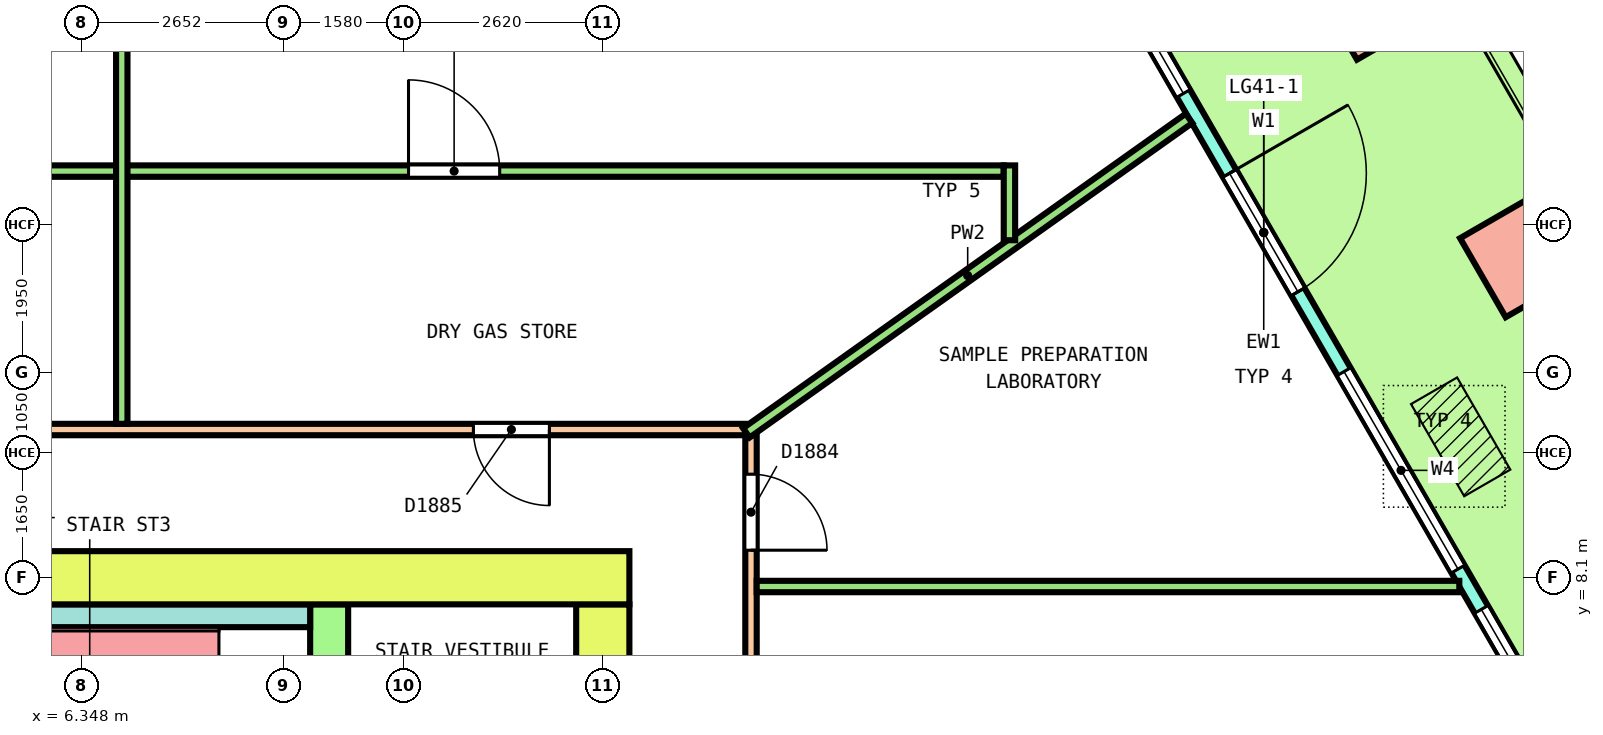
"""IFC4 building model, lengths in metres.
Left out: names, types, materials, properties, quantities, classifications, styles, units other than length and angle.
Written with IfcOpenShell. Run it as: python <this file> out.ifc"""

import sys

from ifc_helpers import new_model, si_unit, direction, frame, frame_2d, origin, origin_2d, place, context, subcontext, project, spatial, polyline, rectangle, outline, extrude, element, fill, save


model = new_model("IFC4")
c1 = context("Model", 3, precision=1e-05, world=origin(), true_north=direction((0.0, 1.0)))
c2 = subcontext(c1, "Body", "Model", "MODEL_VIEW")
j1 = project(units=[si_unit("LENGTHUNIT", "METRE"), si_unit("PLANEANGLEUNIT", "RADIAN")], contexts=[c1])
p1 = place(None, origin())
s1 = spatial("IfcSite", under=j1, at=p1, CompositionType="ELEMENT")
p2 = place(p1, origin())
s2 = spatial("IfcBuilding", under=s1, at=p2, CompositionType="ELEMENT")
p3 = place(p2, frame((0.0, 0.0, 189.2)))
s3 = spatial("IfcBuildingStorey", under=s2, at=p3, CompositionType="ELEMENT", Elevation=189.2)
for number, where, z_axis, x_axis in (
    (1, (25.299, 12.347, 0.0), (0.0, 0.0, 1.0), (-0.5, 0.866, 0.0)),
    (2, (23.342, 15.736, 0.0), (0.0, 0.0, 1.0), (-0.5, 0.866, 0.0)),
):
    element("IfcColumn", number, at=place(p3, frame(where, z_axis=z_axis, x_axis=x_axis)), inside=s3, PredefinedType="COLUMN", context=c2, shape_type="SweptSolid", body=[
        extrude(rectangle(XDim=1.2, YDim=1.2, at=origin_2d()), origin(), (0.0, 0.0, 1.0), 4.05),
    ])
p4 = place(p3, frame((26.411, 4.82, 0.0), z_axis=(0.0, 0.0, 1.0), x_axis=(-0.500000137386, 0.866025324465, 0.0)))
e3 = element("IfcWall", 3, at=p4, inside=s3, PredefinedType="SOLIDWALL", context=c2, shape_type="SweptSolid", body=[
    extrude(outline(polyline([(-0.027, -0.1), (0.979, -0.1), (1.986, -0.1), (2.992, -0.1), (3.999, -0.1), (5.005, -0.1), (6.012, -0.1), (7.018, -0.1), (8.025, -0.1), (9.031, -0.1), (10.038, -0.1), (11.044, -0.1), (12.051, -0.1), (13.057, -0.1), (14.063, -0.1), (15.07, -0.1), (16.076, -0.1), (17.083, -0.1), (18.089, -0.1), (18.036, 0.1), (17.035, 0.1), (16.035, 0.1), (15.034, 0.1), (14.034, 0.1), (13.033, 0.1), (12.033, 0.1), (11.032, 0.1), (10.032, 0.1), (9.031, 0.1), (8.031, 0.1), (7.03, 0.1), (6.03, 0.1), (5.029, 0.1), (4.029, 0.1), (3.028, 0.1), (2.028, 0.1), (1.027, 0.1), (0.027, 0.1), (-0.027, -0.1)])), origin(), (0.0, 0.0, 1.0), 4.1),
])
p5 = place(p4, frame((0.306, 0.0, 0.1)))
e4 = element("IfcOpeningElement", 4, at=p5, cuts=e3, PredefinedType="OPENING", context=c2, shape_type="SweptSolid", body=[
    extrude(rectangle(XDim=3.0, YDim=2.9, at=frame_2d((1.5, 1.45))), frame((0.0, 0.11, 0.0), z_axis=(0.0, -1.0, 0.0), x_axis=(1.0, 0.0, 0.0)), (0.0, 0.0, 1.0), 0.22),
])
p6 = place(p4, frame((3.919, 0.0, 0.1)))
e5 = element("IfcOpeningElement", 5, at=p6, cuts=e3, PredefinedType="OPENING", context=c2, shape_type="SweptSolid", body=[
    extrude(rectangle(XDim=3.0, YDim=2.9, at=frame_2d((1.5, 1.45))), frame((0.0, 0.11, 0.0), z_axis=(0.0, -1.0, 0.0), x_axis=(1.0, 0.0, 0.0)), (0.0, 0.0, 1.0), 0.22),
])
p7 = place(p4, frame((8.131, 0.0, 0.0)))
e6 = element("IfcOpeningElement", 6, at=p7, cuts=e3, PredefinedType="OPENING", context=c2, shape_type="SweptSolid", body=[
    extrude(rectangle(XDim=1.8, YDim=2.4, at=frame_2d((0.9, 1.2))), frame((0.0, 0.11, 0.0), z_axis=(0.0, -1.0, 0.0), x_axis=(1.0, 0.0, 0.0)), (0.0, 0.0, 1.0), 0.22),
])
p8 = place(p4, frame((8.131, 0.0, 2.55)))
e7 = element("IfcOpeningElement", 7, at=p8, cuts=e3, PredefinedType="OPENING", context=c2, shape_type="SweptSolid", body=[
    extrude(rectangle(XDim=1.8, YDim=0.45, at=frame_2d((0.9, 0.225))), frame((0.0, 0.11, 0.0), z_axis=(0.0, -1.0, 0.0), x_axis=(1.0, 0.0, 0.0)), (0.0, 0.0, 1.0), 0.22),
])
p9 = place(p4, frame((11.144, 0.0, 0.1)))
e8 = element("IfcOpeningElement", 8, at=p9, cuts=e3, PredefinedType="OPENING", context=c2, shape_type="SweptSolid", body=[
    extrude(rectangle(XDim=3.0, YDim=2.9, at=frame_2d((1.5, 1.45))), frame((0.0, 0.11, 0.0), z_axis=(0.0, -1.0, 0.0), x_axis=(1.0, 0.0, 0.0)), (0.0, 0.0, 1.0), 0.22),
])
p10 = place(p4, frame((14.756, 0.0, 0.1)))
e9 = element("IfcOpeningElement", 9, at=p10, cuts=e3, PredefinedType="OPENING", context=c2, shape_type="SweptSolid", body=[
    extrude(rectangle(XDim=3.0, YDim=2.9, at=frame_2d((1.5, 1.45))), frame((0.0, 0.11, 0.0), z_axis=(0.0, -1.0, 0.0), x_axis=(1.0, 0.0, 0.0)), (0.0, 0.0, 1.0), 0.22),
])
p11 = place(p3, frame((-13.55, 8.1, 0.0), z_axis=(0.0, 0.0, 1.0), x_axis=(1.0, 0.0, 0.0)))
e10 = element("IfcWall", 10, at=p11, inside=s3, PredefinedType="SHEAR", context=c2, shape_type="SweptSolid", body=[
    extrude(rectangle(XDim=27.1, YDim=0.7, at=frame_2d((13.55, 0.0))), origin(), (0.0, 0.0, 1.0), 4.1),
])
p12 = place(p11, frame((14.475, 0.0, 0.0)))
e11 = element("IfcOpeningElement", 11, at=p12, cuts=e10, PredefinedType="OPENING", context=c2, shape_type="SweptSolid", body=[
    extrude(rectangle(XDim=1.4, YDim=2.1, at=frame_2d((0.7, 1.05))), frame((0.0, 0.36, 0.0), z_axis=(0.0, -1.0, 0.0), x_axis=(1.0, 0.0, 0.0)), (0.0, 0.0, 1.0), 0.72),
])
p13 = place(p3, frame((13.2, -7.75, 0.0), z_axis=(0.0, 0.0, 1.0), x_axis=(0.0, 1.0, 0.0)))
e12 = element("IfcWall", 12, at=p13, inside=s3, PredefinedType="SHEAR", context=c2, shape_type="SweptSolid", body=[
    extrude(rectangle(XDim=15.5, YDim=0.7, at=frame_2d((7.75, 0.0))), origin(), (0.0, 0.0, 1.0), 4.1),
])
p14 = place(p13, frame((6.55, 0.0, 0.0)))
e13 = element("IfcOpeningElement", 13, at=p14, cuts=e12, PredefinedType="OPENING", context=c2, shape_type="SweptSolid", body=[
    extrude(rectangle(XDim=2.4, YDim=2.1, at=frame_2d((1.2, 1.05))), frame((0.0, 0.36, 0.0), z_axis=(0.0, -1.0, 0.0), x_axis=(1.0, 0.0, 0.0)), (0.0, 0.0, 1.0), 0.72),
])
p15 = place(p13, frame((13.45, 0.0, 0.0)))
e14 = element("IfcOpeningElement", 14, at=p15, cuts=e12, PredefinedType="OPENING", context=c2, shape_type="SweptSolid", body=[
    extrude(rectangle(XDim=1.2, YDim=2.1, at=frame_2d((0.6, 1.05))), frame((0.0, 0.36, 0.0), z_axis=(0.0, -1.0, 0.0), x_axis=(1.0, 0.0, 0.0)), (0.0, 0.0, 1.0), 0.72),
])
p16 = place(p13, frame((0.181, 0.0, 0.0)))
e15 = element("IfcOpeningElement", 15, at=p16, cuts=e12, PredefinedType="OPENING", context=c2, shape_type="SweptSolid", body=[
    extrude(rectangle(XDim=1.0, YDim=2.1, at=frame_2d((0.5, 1.05))), frame((0.0, 0.36, 0.0), z_axis=(0.0, -1.0, 0.0), x_axis=(1.0, 0.0, 0.0)), (0.0, 0.0, 1.0), 0.72),
])
p17 = place(p13, frame((1.669, 0.0, 0.0)))
e16 = element("IfcOpeningElement", 16, at=p17, cuts=e12, PredefinedType="OPENING", context=c2, shape_type="SweptSolid", body=[
    extrude(rectangle(XDim=1.0, YDim=2.1, at=frame_2d((0.5, 1.05))), frame((0.0, 0.36, 0.0), z_axis=(0.0, -1.0, 0.0), x_axis=(1.0, 0.0, 0.0)), (0.0, 0.0, 1.0), 0.72),
])
p18 = place(p3, frame((9.6, -7.75, 0.0), z_axis=(0.0, 0.0, 1.0), x_axis=(0.0, 1.0, 0.0)))
e17 = element("IfcWall", 17, at=p18, inside=s3, PredefinedType="SHEAR", context=c2, shape_type="SweptSolid", body=[
    extrude(rectangle(XDim=15.5, YDim=0.5, at=frame_2d((7.75, 0.0))), origin(), (0.0, 0.0, 1.0), 4.1),
])
p19 = place(p18, frame((6.55, 0.0, 0.0)))
e18 = element("IfcOpeningElement", 18, at=p19, cuts=e17, PredefinedType="OPENING", context=c2, shape_type="SweptSolid", body=[
    extrude(rectangle(XDim=2.4, YDim=2.1, at=frame_2d((1.2, 1.05))), frame((0.0, 0.26, 0.0), z_axis=(0.0, -1.0, 0.0), x_axis=(1.0, 0.0, 0.0)), (0.0, 0.0, 1.0), 0.52),
])
p20 = place(p18, frame((13.45, 0.0, 0.0)))
e19 = element("IfcOpeningElement", 19, at=p20, cuts=e17, PredefinedType="OPENING", context=c2, shape_type="SweptSolid", body=[
    extrude(rectangle(XDim=1.2, YDim=2.1, at=frame_2d((0.6, 1.05))), frame((0.0, 0.26, 0.0), z_axis=(0.0, -1.0, 0.0), x_axis=(1.0, 0.0, 0.0)), (0.0, 0.0, 1.0), 0.52),
])
p21 = place(p18, frame((0.95, 0.0, 0.0)))
e20 = element("IfcOpeningElement", 20, at=p21, cuts=e17, PredefinedType="OPENING", context=c2, shape_type="SweptSolid", body=[
    extrude(rectangle(XDim=1.0, YDim=2.1, at=frame_2d((0.5, 1.05))), frame((0.0, 0.26, 0.0), z_axis=(0.0, -1.0, 0.0), x_axis=(1.0, 0.0, 0.0)), (0.0, 0.0, 1.0), 0.52),
])
p22 = place(p3, frame((3.55, 7.6, 0.0), z_axis=(0.0, 0.0, 1.0), x_axis=(1.0, 0.0, 0.0)))
e21 = element("IfcWall", 21, at=p22, inside=s3, PredefinedType="SOLIDWALL", context=c2, shape_type="SweptSolid", body=[
    extrude(rectangle(XDim=5.8, YDim=0.3, at=frame_2d((2.9, 0.0))), origin(), (0.0, 0.0, 1.0), 4.1),
])
p23 = place(p3, frame((15.15, 0.576, 0.0), z_axis=(0.0, 0.0, 1.0), x_axis=(0.0, 1.0, 0.0)))
e22 = element("IfcWall", 22, at=p23, inside=s3, PredefinedType="PARTITIONING", context=c2, shape_type="SweptSolid", body=[
    extrude(rectangle(XDim=9.399, YDim=0.15, at=frame_2d((4.7, 0.0))), origin(), (0.0, 0.0, 1.0), 3.05),
])
p24 = place(p23, frame((7.887, 0.0, 0.0)))
e23 = element("IfcOpeningElement", 23, at=p24, cuts=e22, PredefinedType="OPENING", context=c2, shape_type="SweptSolid", body=[
    extrude(rectangle(XDim=1.0, YDim=2.1, at=frame_2d((0.5, 1.05))), frame((0.0, 0.085, 0.0), z_axis=(0.0, -1.0, 0.0), x_axis=(1.0, 0.0, 0.0)), (0.0, 0.0, 1.0), 0.17),
])
p25 = place(p3, frame((-15.075, 10.05, 0.0), z_axis=(0.0, 0.0, 1.0), x_axis=(1.0, 0.0, 0.0)))
e24 = element("IfcWall", 24, at=p25, inside=s3, PredefinedType="PARTITIONING", context=c2, shape_type="SweptSolid", body=[
    extrude(rectangle(XDim=30.15, YDim=0.15, at=frame_2d((15.075, 0.0))), origin(), (0.0, 0.0, 1.0), 3.05),
])
p26 = place(p25, frame((26.573, 0.0, 0.0)))
e25 = element("IfcOpeningElement", 25, at=p26, cuts=e24, PredefinedType="OPENING", context=c2, shape_type="SweptSolid", body=[
    extrude(rectangle(XDim=1.0, YDim=2.1, at=frame_2d((0.5, 1.05))), frame((0.0, 0.085, 0.0), z_axis=(0.0, -1.0, 0.0), x_axis=(1.0, 0.0, 0.0)), (0.0, 0.0, 1.0), 0.17),
])
p27 = place(p25, frame((10.684, 0.0, 0.0)))
e26 = element("IfcOpeningElement", 26, at=p27, cuts=e24, PredefinedType="OPENING", context=c2, shape_type="SweptSolid", body=[
    extrude(rectangle(XDim=1.2, YDim=2.1, at=frame_2d((0.6, 1.05))), frame((0.0, 0.085, 0.0), z_axis=(0.0, -1.0, 0.0), x_axis=(1.0, 0.0, 0.0)), (0.0, 0.0, 1.0), 0.17),
])
p28 = place(p3, frame((15.225, 7.985, 0.0), z_axis=(0.0, 0.0, 1.0), x_axis=(1.0, 0.0, 0.0)))
e27 = element("IfcWall", 27, at=p28, inside=s3, PredefinedType="PARTITIONING", context=c2, shape_type="SweptSolid", body=[
    extrude(rectangle(XDim=9.243, YDim=0.15, at=frame_2d((4.622, 0.0))), origin(), (0.0, 0.0, 1.0), 3.05),
])
p29 = place(p3, frame((15.089, 10.007, 0.0), z_axis=(0.0, 0.0, 1.0), x_axis=(0.815227116073, 0.579141389661, 0.0)))
e28 = element("IfcWall", 28, at=p29, inside=s3, PredefinedType="PARTITIONING", context=c2, shape_type="SweptSolid", body=[
    extrude(rectangle(XDim=7.144, YDim=0.15, at=frame_2d((3.572, 0.0))), origin(), (0.0, 0.0, 1.0), 3.05),
])
p30 = place(p3, frame((-16.979, 13.45, 0.0), z_axis=(0.0, 0.0, 1.0), x_axis=(1.0, 0.0, 0.0)))
e29 = element("IfcWall", 29, at=p30, inside=s3, PredefinedType="PARTITIONING", context=c2, shape_type="SweptSolid", body=[
    extrude(rectangle(XDim=35.454, YDim=0.15, at=frame_2d((17.727, 0.0))), origin(), (0.0, 0.0, 1.0), 3.05),
])
p31 = place(p30, frame((27.623, 0.0, 0.0)))
e30 = element("IfcOpeningElement", 30, at=p31, cuts=e29, PredefinedType="OPENING", context=c2, shape_type="SweptSolid", body=[
    extrude(rectangle(XDim=1.2, YDim=2.1, at=frame_2d((0.6, 1.05))), frame((0.0, 0.085, 0.0), z_axis=(0.0, -1.0, 0.0), x_axis=(1.0, 0.0, 0.0)), (0.0, 0.0, 1.0), 0.17),
])
p32 = place(p3, frame((18.55, 12.541, 0.0), z_axis=(0.0, 0.0, 1.0), x_axis=(0.0, 1.0, 0.0)))
e31 = element("IfcWall", 31, at=p32, inside=s3, PredefinedType="PARTITIONING", context=c2, shape_type="SweptSolid", body=[
    extrude(rectangle(XDim=0.984, YDim=0.15, at=frame_2d((0.492, 0.0))), origin(), (0.0, 0.0, 1.0), 3.05),
])
p33 = place(p3, frame((6.872, 10.125, 0.0), z_axis=(0.0, 0.0, 1.0), x_axis=(0.0, 1.0, 0.0)))
e32 = element("IfcWall", 32, at=p33, inside=s3, PredefinedType="PARTITIONING", context=c2, shape_type="SweptSolid", body=[
    extrude(rectangle(XDim=13.675, YDim=0.15, at=frame_2d((6.837, 0.0))), origin(), (0.0, 0.0, 1.0), 3.05),
])
p34 = place(p33, frame((6.633, 0.0, 0.0)))
e33 = element("IfcOpeningElement", 33, at=p34, cuts=e32, PredefinedType="OPENING", context=c2, shape_type="SweptSolid", body=[
    extrude(rectangle(XDim=1.2, YDim=2.1, at=frame_2d((0.6, 1.05))), frame((0.0, 0.085, 0.0), z_axis=(0.0, -1.0, 0.0), x_axis=(1.0, 0.0, 0.0)), (0.0, 0.0, 1.0), 0.17),
])
p35 = place(p5, origin())
e34 = element("IfcWindow", 34, at=p35, inside=s3, PartitioningType="SINGLE_PANEL", PredefinedType="WINDOW", context=c2, shape_type="SweptSolid", body=[
    extrude(rectangle(XDim=3.0, YDim=2.9, at=frame_2d((1.5, 1.45))), frame((0.0, 0.03, 0.0), z_axis=(0.0, -1.0, 0.0), x_axis=(1.0, 0.0, 0.0)), (0.0, 0.0, 1.0), 0.06),
])
fill(e4, e34)
p36 = place(p6, origin())
e35 = element("IfcWindow", 35, at=p36, inside=s3, PartitioningType="SINGLE_PANEL", PredefinedType="WINDOW", context=c2, shape_type="SweptSolid", body=[
    extrude(rectangle(XDim=3.0, YDim=2.9, at=frame_2d((1.5, 1.45))), frame((0.0, 0.03, 0.0), z_axis=(0.0, -1.0, 0.0), x_axis=(1.0, 0.0, 0.0)), (0.0, 0.0, 1.0), 0.06),
])
fill(e5, e35)
p37 = place(p7, origin())
e36 = element("IfcDoor", 36, at=p37, inside=s3, OperationType="DOUBLE_DOOR_SINGLE_SWING", PredefinedType="DOOR", context=c2, shape_type="SweptSolid", body=[
    extrude(rectangle(XDim=1.8, YDim=2.4, at=frame_2d((0.9, 1.2))), frame((0.0, 0.025, 0.0), z_axis=(0.0, -1.0, 0.0), x_axis=(1.0, 0.0, 0.0)), (0.0, 0.0, 1.0), 0.05),
])
fill(e6, e36)
p38 = place(p8, origin())
e37 = element("IfcWindow", 37, at=p38, inside=s3, PartitioningType="SINGLE_PANEL", PredefinedType="WINDOW", context=c2, shape_type="SweptSolid", body=[
    extrude(rectangle(XDim=1.8, YDim=0.45, at=frame_2d((0.9, 0.225))), frame((0.0, 0.03, 0.0), z_axis=(0.0, -1.0, 0.0), x_axis=(1.0, 0.0, 0.0)), (0.0, 0.0, 1.0), 0.06),
])
fill(e7, e37)
p39 = place(p9, origin())
e38 = element("IfcWindow", 38, at=p39, inside=s3, PartitioningType="SINGLE_PANEL", PredefinedType="WINDOW", context=c2, shape_type="SweptSolid", body=[
    extrude(rectangle(XDim=3.0, YDim=2.9, at=frame_2d((1.5, 1.45))), frame((0.0, 0.03, 0.0), z_axis=(0.0, -1.0, 0.0), x_axis=(1.0, 0.0, 0.0)), (0.0, 0.0, 1.0), 0.06),
])
fill(e8, e38)
p40 = place(p24, origin())
e39 = element("IfcDoor", 39, at=p40, inside=s3, OperationType="SINGLE_SWING_RIGHT", PredefinedType="DOOR", context=c2, shape_type="SweptSolid", body=[
    extrude(rectangle(XDim=1.0, YDim=2.1, at=frame_2d((0.5, 1.05))), frame((0.0, 0.025, 0.0), z_axis=(0.0, -1.0, 0.0), x_axis=(1.0, 0.0, 0.0)), (0.0, 0.0, 1.0), 0.05),
])
fill(e23, e39)
p41 = place(p26, origin())
e40 = element("IfcDoor", 40, at=p41, inside=s3, OperationType="SINGLE_SWING_LEFT", PredefinedType="DOOR", context=c2, shape_type="SweptSolid", body=[
    extrude(rectangle(XDim=1.0, YDim=2.1, at=frame_2d((0.5, 1.05))), frame((0.0, 0.025, 0.0), z_axis=(0.0, -1.0, 0.0), x_axis=(1.0, 0.0, 0.0)), (0.0, 0.0, 1.0), 0.05),
])
fill(e25, e40)
p42 = place(p31, origin())
e41 = element("IfcDoor", 41, at=p42, inside=s3, OperationType="DOUBLE_DOOR_SINGLE_SWING", PredefinedType="DOOR", context=c2, shape_type="SweptSolid", body=[
    extrude(rectangle(XDim=1.2, YDim=2.1, at=frame_2d((0.6, 1.05))), frame((0.0, 0.025, 0.0), z_axis=(0.0, -1.0, 0.0), x_axis=(1.0, 0.0, 0.0)), (0.0, 0.0, 1.0), 0.05),
])
fill(e30, e41)
save(model, sys.argv[1])
